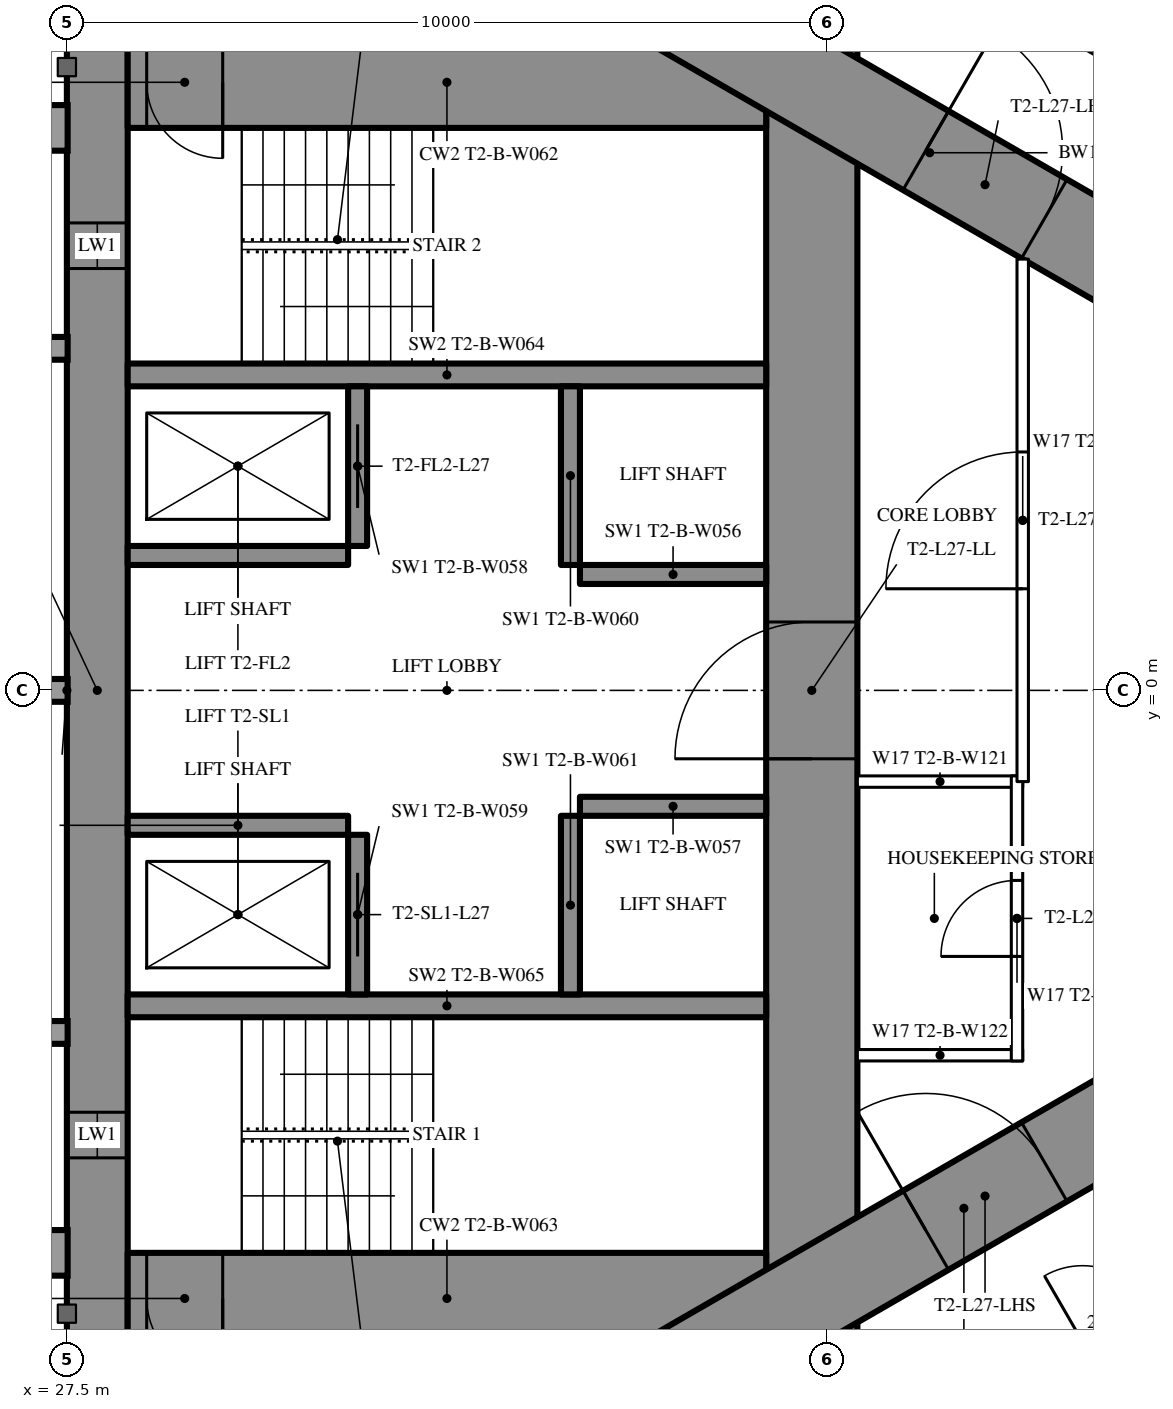
"""IFC4 building model, lengths in metres.
Left out: names, types, materials, properties, quantities, classifications, styles, units other than length and angle.
Written with IfcOpenShell. Run it as: python <this file> out.ifc"""

import sys

from ifc_helpers import new_model, si_unit, direction, frame, frame_2d, origin, place, context, subcontext, project, spatial, rectangle, extrude, element, fill, save


model = new_model("IFC4")
c1 = context("Model", 3, precision=1e-05, world=origin(), true_north=direction((0.0, 1.0)))
c2 = subcontext(c1, "Body", "Model", "MODEL_VIEW")
j1 = project(units=[si_unit("LENGTHUNIT", "METRE"), si_unit("PLANEANGLEUNIT", "RADIAN")], contexts=[c1])
p1 = place(None, origin())
s1 = spatial("IfcSite", under=j1, at=p1, CompositionType="ELEMENT")
p2 = place(p1, origin())
s2 = spatial("IfcBuilding", under=s1, at=p2, CompositionType="ELEMENT")
p3 = place(p2, frame((0.0, 0.0, 104.6)))
s3 = spatial("IfcBuildingStorey", under=s2, at=p3, CompositionType="ELEMENT", Elevation=104.6)
p4 = place(p3, frame((27.9, -8.6, 0.0), z_axis=(0.0, 0.0, 1.0), x_axis=(0.0, 1.0, 0.0)))
e1 = element("IfcWall", 1, at=p4, inside=s3, PredefinedType="SHEAR", context=c2, shape_type="SweptSolid", body=[
    extrude(rectangle(XDim=17.2, YDim=0.8, at=frame_2d((8.6, 0.0))), origin(), (0.0, 0.0, 1.0), 3.5),
])
p5 = place(p4, frame((2.45, 0.0, 0.6)))
e2 = element("IfcOpeningElement", 2, at=p5, cuts=e1, PredefinedType="OPENING", context=c2, shape_type="SweptSolid", body=[
    extrude(rectangle(XDim=0.6, YDim=2.1, at=frame_2d((0.3, 1.05))), frame((0.0, 0.41, 0.0), z_axis=(0.0, -1.0, 0.0), x_axis=(1.0, 0.0, 0.0)), (0.0, 0.0, 1.0), 0.82),
])
p6 = place(p4, frame((14.15, 0.0, 0.6)))
e3 = element("IfcOpeningElement", 3, at=p6, cuts=e1, PredefinedType="OPENING", context=c2, shape_type="SweptSolid", body=[
    extrude(rectangle(XDim=0.6, YDim=2.1, at=frame_2d((0.3, 1.05))), frame((0.0, 0.41, 0.0), z_axis=(0.0, -1.0, 0.0), x_axis=(1.0, 0.0, 0.0)), (0.0, 0.0, 1.0), 0.82),
])
p7 = place(p3, frame((37.3, -8.6, 0.0), z_axis=(0.0, 0.0, 1.0), x_axis=(0.0, 1.0, 0.0)))
e4 = element("IfcWall", 4, at=p7, inside=s3, PredefinedType="SHEAR", context=c2, shape_type="SweptSolid", body=[
    extrude(rectangle(XDim=17.2, YDim=1.2, at=frame_2d((8.6, 0.0))), origin(), (0.0, 0.0, 1.0), 3.5),
])
p8 = place(p7, frame((7.7, 0.0, 0.0)))
e5 = element("IfcOpeningElement", 5, at=p8, cuts=e4, PredefinedType="OPENING", context=c2, shape_type="SweptSolid", body=[
    extrude(rectangle(XDim=1.8, YDim=2.2, at=frame_2d((0.9, 1.1))), frame((0.0, 0.61, 0.0), z_axis=(0.0, -1.0, 0.0), x_axis=(1.0, 0.0, 0.0)), (0.0, 0.0, 1.0), 1.22),
])
p9 = place(p3, frame((28.3, -8.0, 0.0), z_axis=(0.0, 0.0, 1.0), x_axis=(1.0, 0.0, 0.0)))
e6 = element("IfcWall", 6, at=p9, inside=s3, PredefinedType="SHEAR", context=c2, shape_type="SweptSolid", body=[
    extrude(rectangle(XDim=8.4, YDim=1.2, at=frame_2d((4.2, 0.0))), origin(), (0.0, 0.0, 1.0), 3.5),
])
p10 = place(p9, frame((0.25, 0.0, 0.0)))
e7 = element("IfcOpeningElement", 7, at=p10, cuts=e6, PredefinedType="OPENING", context=c2, shape_type="SweptSolid", body=[
    extrude(rectangle(XDim=1.0, YDim=2.2, at=frame_2d((0.5, 1.1))), frame((0.0, 0.61, 0.0), z_axis=(0.0, -1.0, 0.0), x_axis=(1.0, 0.0, 0.0)), (0.0, 0.0, 1.0), 1.22),
])
p11 = place(p3, frame((28.3, 8.0, 0.0), z_axis=(0.0, 0.0, 1.0), x_axis=(1.0, 0.0, 0.0)))
e8 = element("IfcWall", 8, at=p11, inside=s3, PredefinedType="SHEAR", context=c2, shape_type="SweptSolid", body=[
    extrude(rectangle(XDim=8.4, YDim=1.2, at=frame_2d((4.2, 0.0))), origin(), (0.0, 0.0, 1.0), 3.5),
])
p12 = place(p11, frame((0.25, 0.0, 0.0)))
e9 = element("IfcOpeningElement", 9, at=p12, cuts=e8, PredefinedType="OPENING", context=c2, shape_type="SweptSolid", body=[
    extrude(rectangle(XDim=1.0, YDim=2.2, at=frame_2d((0.5, 1.1))), frame((0.0, 0.61, 0.0), z_axis=(0.0, -1.0, 0.0), x_axis=(1.0, 0.0, 0.0)), (0.0, 0.0, 1.0), 1.22),
])
for number, where, z_axis, x_axis in (
    (10, (28.3, -4.15, 0.0), (0.0, 0.0, 1.0), (1.0, 0.0, 0.0)),
    (11, (28.3, 4.15, 0.0), (0.0, 0.0, 1.0), (1.0, 0.0, 0.0)),
):
    element("IfcWall", number, at=place(p3, frame(where, z_axis=z_axis, x_axis=x_axis)), inside=s3, PredefinedType="SHEAR", context=c2, shape_type="SweptSolid", body=[
        extrude(rectangle(XDim=8.4, YDim=0.3, at=frame_2d((4.2, 0.0))), origin(), (0.0, 0.0, 1.0), 3.5),
    ])
p13 = place(p3, frame((31.325, -4.0, 0.0), z_axis=(0.0, 0.0, 1.0), x_axis=(0.0, 1.0, 0.0)))
e12 = element("IfcWall", 12, at=p13, inside=s3, PredefinedType="SHEAR", context=c2, shape_type="SweptSolid", body=[
    extrude(rectangle(XDim=2.1, YDim=0.25, at=frame_2d((1.05, 0.0))), origin(), (0.0, 0.0, 1.0), 3.5),
])
p14 = place(p13, frame((0.5, 0.0, 0.0)))
e13 = element("IfcOpeningElement", 13, at=p14, cuts=e12, PredefinedType="OPENING", context=c2, shape_type="SweptSolid", body=[
    extrude(rectangle(XDim=1.1, YDim=2.2, at=frame_2d((0.55, 1.1))), frame((0.0, 0.135, 0.0), z_axis=(0.0, -1.0, 0.0), x_axis=(1.0, 0.0, 0.0)), (0.0, 0.0, 1.0), 0.27),
])
p15 = place(p3, frame((34.125, -4.0, 0.0), z_axis=(0.0, 0.0, 1.0), x_axis=(0.0, 1.0, 0.0)))
e14 = element("IfcWall", 14, at=p15, inside=s3, PredefinedType="SHEAR", context=c2, shape_type="SweptSolid", body=[
    extrude(rectangle(XDim=2.35, YDim=0.25, at=frame_2d((1.175, 0.0))), origin(), (0.0, 0.0, 1.0), 3.5),
])
p16 = place(p3, frame((28.3, -1.775, 0.0), z_axis=(0.0, 0.0, 1.0), x_axis=(1.0, 0.0, 0.0)))
e15 = element("IfcWall", 15, at=p16, inside=s3, PredefinedType="SHEAR", context=c2, shape_type="SweptSolid", body=[
    extrude(rectangle(XDim=2.9, YDim=0.25, at=frame_2d((1.45, 0.0))), origin(), (0.0, 0.0, 1.0), 3.5),
])
p17 = place(p3, frame((34.25, -1.525, 0.0), z_axis=(0.0, 0.0, 1.0), x_axis=(1.0, 0.0, 0.0)))
e16 = element("IfcWall", 16, at=p17, inside=s3, PredefinedType="SHEAR", context=c2, shape_type="SweptSolid", body=[
    extrude(rectangle(XDim=2.45, YDim=0.25, at=frame_2d((1.225, 0.0))), origin(), (0.0, 0.0, 1.0), 3.5),
])
p18 = place(p3, frame((31.325, 1.9, 0.0), z_axis=(0.0, 0.0, 1.0), x_axis=(0.0, 1.0, 0.0)))
e17 = element("IfcWall", 17, at=p18, inside=s3, PredefinedType="SHEAR", context=c2, shape_type="SweptSolid", body=[
    extrude(rectangle(XDim=2.1, YDim=0.25, at=frame_2d((1.05, 0.0))), origin(), (0.0, 0.0, 1.0), 3.5),
])
p19 = place(p18, frame((0.5, 0.0, 0.0)))
e18 = element("IfcOpeningElement", 18, at=p19, cuts=e17, PredefinedType="OPENING", context=c2, shape_type="SweptSolid", body=[
    extrude(rectangle(XDim=1.1, YDim=2.2, at=frame_2d((0.55, 1.1))), frame((0.0, 0.135, 0.0), z_axis=(0.0, -1.0, 0.0), x_axis=(1.0, 0.0, 0.0)), (0.0, 0.0, 1.0), 0.27),
])
p20 = place(p3, frame((34.125, 1.65, 0.0), z_axis=(0.0, 0.0, 1.0), x_axis=(0.0, 1.0, 0.0)))
e19 = element("IfcWall", 19, at=p20, inside=s3, PredefinedType="SHEAR", context=c2, shape_type="SweptSolid", body=[
    extrude(rectangle(XDim=2.35, YDim=0.25, at=frame_2d((1.175, 0.0))), origin(), (0.0, 0.0, 1.0), 3.5),
])
p21 = place(p3, frame((28.3, 1.775, 0.0), z_axis=(0.0, 0.0, 1.0), x_axis=(1.0, 0.0, 0.0)))
e20 = element("IfcWall", 20, at=p21, inside=s3, PredefinedType="SHEAR", context=c2, shape_type="SweptSolid", body=[
    extrude(rectangle(XDim=2.9, YDim=0.25, at=frame_2d((1.45, 0.0))), origin(), (0.0, 0.0, 1.0), 3.5),
])
p22 = place(p3, frame((34.25, 1.525, 0.0), z_axis=(0.0, 0.0, 1.0), x_axis=(1.0, 0.0, 0.0)))
e21 = element("IfcWall", 21, at=p22, inside=s3, PredefinedType="SHEAR", context=c2, shape_type="SweptSolid", body=[
    extrude(rectangle(XDim=2.45, YDim=0.25, at=frame_2d((1.225, 0.0))), origin(), (0.0, 0.0, 1.0), 3.5),
])
p23 = place(p3, frame((27.2, -13.8, 0.0), z_axis=(0.0, 0.0, 1.0), x_axis=(0.866027159892, 0.499996958321, 0.0)))
e22 = element("IfcWall", 22, at=p23, inside=s3, PredefinedType="SHEAR", context=c2, shape_type="SweptSolid", body=[
    extrude(rectangle(XDim=27.947, YDim=1.2, at=frame_2d((13.973, 0.0))), origin(), (0.0, 0.0, 1.0), 3.5),
])
p24 = place(p23, frame((4.6, 0.0, 0.0)))
e23 = element("IfcOpeningElement", 23, at=p24, cuts=e22, PredefinedType="OPENING", context=c2, shape_type="SweptSolid", body=[
    extrude(rectangle(XDim=1.0, YDim=2.2, at=frame_2d((0.5, 1.1))), frame((0.0, 0.61, 0.0), z_axis=(0.0, -1.0, 0.0), x_axis=(1.0, 0.0, 0.0)), (0.0, 0.0, 1.0), 1.22),
])
p25 = place(p23, frame((13.395, 0.0, 0.0)))
e24 = element("IfcOpeningElement", 24, at=p25, cuts=e22, PredefinedType="OPENING", context=c2, shape_type="SweptSolid", body=[
    extrude(rectangle(XDim=1.8, YDim=2.2, at=frame_2d((0.9, 1.1))), frame((0.0, 0.61, 0.0), z_axis=(0.0, -1.0, 0.0), x_axis=(1.0, 0.0, 0.0)), (0.0, 0.0, 1.0), 1.22),
])
p26 = place(p3, frame((27.2, 13.8, 0.0), z_axis=(0.0, 0.0, 1.0), x_axis=(0.866024515034, -0.500001539357, 0.0)))
e25 = element("IfcWall", 25, at=p26, inside=s3, PredefinedType="SHEAR", context=c2, shape_type="SweptSolid", body=[
    extrude(rectangle(XDim=26.907, YDim=1.2, at=frame_2d((13.454, 0.0))), origin(), (0.0, 0.0, 1.0), 3.5),
])
p27 = place(p26, frame((4.6, 0.0, 0.0)))
e26 = element("IfcOpeningElement", 26, at=p27, cuts=e25, PredefinedType="OPENING", context=c2, shape_type="SweptSolid", body=[
    extrude(rectangle(XDim=1.0, YDim=2.2, at=frame_2d((0.5, 1.1))), frame((0.0, 0.61, 0.0), z_axis=(0.0, -1.0, 0.0), x_axis=(1.0, 0.0, 0.0)), (0.0, 0.0, 1.0), 1.22),
])
p28 = place(p26, frame((13.395, 0.0, 0.0)))
e27 = element("IfcOpeningElement", 27, at=p28, cuts=e25, PredefinedType="OPENING", context=c2, shape_type="SweptSolid", body=[
    extrude(rectangle(XDim=1.8, YDim=2.2, at=frame_2d((0.9, 1.1))), frame((0.0, 0.61, 0.0), z_axis=(0.0, -1.0, 0.0), x_axis=(1.0, 0.0, 0.0)), (0.0, 0.0, 1.0), 1.22),
])
p29 = place(p3, frame((36.834, 10.894, 0.0), z_axis=(0.0, 0.0, 1.0), x_axis=(0.866028157229, -0.499995230863, 0.0)))
e28 = element("IfcWall", 28, at=p29, inside=s3, PredefinedType="PARTITIONING", context=c2, shape_type="SweptSolid", body=[
    extrude(rectangle(XDim=21.667, YDim=0.2, at=frame_2d((10.833, 0.0))), origin(), (0.0, 0.0, 1.0), 3.25),
])
p30 = place(p29, frame((20.117, 0.0, 0.0)))
e29 = element("IfcOpeningElement", 29, at=p30, cuts=e28, PredefinedType="OPENING", context=c2, shape_type="SweptSolid", body=[
    extrude(rectangle(XDim=0.95, YDim=2.2, at=frame_2d((0.475, 1.1))), frame((0.0, 0.11, 0.0), z_axis=(0.0, -1.0, 0.0), x_axis=(1.0, 0.0, 0.0)), (0.0, 0.0, 1.0), 0.22),
])
p31 = place(p29, frame((14.335, 0.0, 0.0)))
e30 = element("IfcOpeningElement", 30, at=p31, cuts=e28, PredefinedType="OPENING", context=c2, shape_type="SweptSolid", body=[
    extrude(rectangle(XDim=0.95, YDim=2.2, at=frame_2d((0.475, 1.1))), frame((0.0, 0.11, 0.0), z_axis=(0.0, -1.0, 0.0), x_axis=(1.0, 0.0, 0.0)), (0.0, 0.0, 1.0), 0.22),
])
p32 = place(p29, frame((9.693, 0.0, 0.0)))
e31 = element("IfcOpeningElement", 31, at=p32, cuts=e28, PredefinedType="OPENING", context=c2, shape_type="SweptSolid", body=[
    extrude(rectangle(XDim=0.95, YDim=2.2, at=frame_2d((0.475, 1.1))), frame((0.0, 0.11, 0.0), z_axis=(0.0, -1.0, 0.0), x_axis=(1.0, 0.0, 0.0)), (0.0, 0.0, 1.0), 0.22),
])
p33 = place(p29, frame((2.95, 0.0, 0.0)))
e32 = element("IfcOpeningElement", 32, at=p33, cuts=e28, PredefinedType="OPENING", context=c2, shape_type="SweptSolid", body=[
    extrude(rectangle(XDim=0.95, YDim=2.2, at=frame_2d((0.475, 1.1))), frame((0.0, 0.11, 0.0), z_axis=(0.0, -1.0, 0.0), x_axis=(1.0, 0.0, 0.0)), (0.0, 0.0, 1.0), 0.22),
])
p34 = place(p3, frame((37.96, -10.243, 0.0), z_axis=(0.0, 0.0, 1.0), x_axis=(0.86603350054, 0.499985975746, 0.0)))
e33 = element("IfcWall", 33, at=p34, inside=s3, PredefinedType="PARTITIONING", context=c2, shape_type="SweptSolid", body=[
    extrude(rectangle(XDim=7.993, YDim=0.2, at=frame_2d((3.997, 0.0))), origin(), (0.0, 0.0, 1.0), 3.25),
])
p35 = place(p34, frame((3.35, 0.0, 0.0)))
e34 = element("IfcOpeningElement", 34, at=p35, cuts=e33, PredefinedType="OPENING", context=c2, shape_type="SweptSolid", body=[
    extrude(rectangle(XDim=1.0, YDim=2.2, at=frame_2d((0.5, 1.1))), frame((0.0, 0.11, 0.0), z_axis=(0.0, -1.0, 0.0), x_axis=(1.0, 0.0, 0.0)), (0.0, 0.0, 1.0), 0.22),
])
for number, where, z_axis, x_axis in (
    (35, (37.9, -1.2, 0.0), (0.0, 0.0, 1.0), (1.0, 0.0, 0.0)),
    (36, (37.9, -4.8, 0.0), (0.0, 0.0, 1.0), (1.0, 0.0, 0.0)),
):
    element("IfcWall", number, at=place(p3, frame(where, z_axis=z_axis, x_axis=x_axis)), inside=s3, PredefinedType="PARTITIONING", context=c2, shape_type="SweptSolid", body=[
        extrude(rectangle(XDim=2.175, YDim=0.15, at=frame_2d((1.087, 0.0))), origin(), (0.0, 0.0, 1.0), 3.25),
    ])
p36 = place(p3, frame((40.0, -4.875, 0.0), z_axis=(0.0, 0.0, 1.0), x_axis=(0.0, 1.0, 0.0)))
e37 = element("IfcWall", 37, at=p36, inside=s3, PredefinedType="PARTITIONING", context=c2, shape_type="SweptSolid", body=[
    extrude(rectangle(XDim=3.75, YDim=0.15, at=frame_2d((1.875, 0.0))), origin(), (0.0, 0.0, 1.0), 3.25),
])
p37 = place(p36, frame((1.375, 0.0, 0.0)))
e38 = element("IfcOpeningElement", 38, at=p37, cuts=e37, PredefinedType="OPENING", context=c2, shape_type="SweptSolid", body=[
    extrude(rectangle(XDim=1.0, YDim=2.2, at=frame_2d((0.5, 1.1))), frame((0.0, 0.085, 0.0), z_axis=(0.0, -1.0, 0.0), x_axis=(1.0, 0.0, 0.0)), (0.0, 0.0, 1.0), 0.17),
])
p38 = place(p3, frame((40.075, -1.2, 0.0), z_axis=(0.0, 0.0, 1.0), x_axis=(0.0, 1.0, 0.0)))
e39 = element("IfcWall", 39, at=p38, inside=s3, PredefinedType="PARTITIONING", context=c2, shape_type="SweptSolid", body=[
    extrude(rectangle(XDim=6.874, YDim=0.15, at=frame_2d((3.437, 0.0))), origin(), (0.0, 0.0, 1.0), 3.25),
])
p39 = place(p38, frame((2.537, 0.0, 0.0)))
e40 = element("IfcOpeningElement", 40, at=p39, cuts=e39, PredefinedType="OPENING", context=c2, shape_type="SweptSolid", body=[
    extrude(rectangle(XDim=1.8, YDim=2.2, at=frame_2d((0.9, 1.1))), frame((0.0, 0.085, 0.0), z_axis=(0.0, -1.0, 0.0), x_axis=(1.0, 0.0, 0.0)), (0.0, 0.0, 1.0), 0.17),
])
p40 = place(p35, origin())
e41 = element("IfcDoor", 41, at=p40, inside=s3, OperationType="SINGLE_SWING_LEFT", PredefinedType="DOOR", context=c2, shape_type="SweptSolid", body=[
    extrude(rectangle(XDim=1.0, YDim=2.2, at=frame_2d((0.5, 1.1))), frame((0.0, 0.025, 0.0), z_axis=(0.0, -1.0, 0.0), x_axis=(1.0, 0.0, 0.0)), (0.0, 0.0, 1.0), 0.05),
])
fill(e34, e41)
p41 = place(p37, origin())
e42 = element("IfcDoor", 42, at=p41, inside=s3, OperationType="SINGLE_SWING_LEFT", PredefinedType="DOOR", context=c2, shape_type="SweptSolid", body=[
    extrude(rectangle(XDim=1.0, YDim=2.2, at=frame_2d((0.5, 1.1))), frame((0.0, 0.025, 0.0), z_axis=(0.0, -1.0, 0.0), x_axis=(1.0, 0.0, 0.0)), (0.0, 0.0, 1.0), 0.05),
])
fill(e38, e42)
p42 = place(p39, origin())
e43 = element("IfcDoor", 43, at=p42, inside=s3, OperationType="DOUBLE_DOOR_SINGLE_SWING", PredefinedType="DOOR", context=c2, shape_type="SweptSolid", body=[
    extrude(rectangle(XDim=1.8, YDim=2.2, at=frame_2d((0.9, 1.1))), frame((0.0, 0.025, 0.0), z_axis=(0.0, -1.0, 0.0), x_axis=(1.0, 0.0, 0.0)), (0.0, 0.0, 1.0), 0.05),
])
fill(e40, e43)
p43 = place(p25, origin())
e44 = element("IfcDoor", 44, at=p43, inside=s3, OperationType="DOUBLE_DOOR_SINGLE_SWING", PredefinedType="DOOR", context=c2, shape_type="SweptSolid", body=[
    extrude(rectangle(XDim=1.8, YDim=2.2, at=frame_2d((0.9, 1.1))), frame((0.0, 0.025, 0.0), z_axis=(0.0, -1.0, 0.0), x_axis=(1.0, 0.0, 0.0)), (0.0, 0.0, 1.0), 0.05),
])
fill(e24, e44)
p44 = place(p28, origin())
e45 = element("IfcDoor", 45, at=p44, inside=s3, OperationType="DOUBLE_DOOR_SINGLE_SWING", PredefinedType="DOOR", context=c2, shape_type="SweptSolid", body=[
    extrude(rectangle(XDim=1.8, YDim=2.2, at=frame_2d((0.9, 1.1))), frame((0.0, 0.025, 0.0), z_axis=(0.0, -1.0, 0.0), x_axis=(1.0, 0.0, 0.0)), (0.0, 0.0, 1.0), 0.05),
])
fill(e27, e45)
p45 = place(p8, origin())
e46 = element("IfcDoor", 46, at=p45, inside=s3, OperationType="DOUBLE_DOOR_SINGLE_SWING", PredefinedType="DOOR", context=c2, shape_type="SweptSolid", body=[
    extrude(rectangle(XDim=1.8, YDim=2.2, at=frame_2d((0.9, 1.1))), frame((0.0, 0.025, 0.0), z_axis=(0.0, -1.0, 0.0), x_axis=(1.0, 0.0, 0.0)), (0.0, 0.0, 1.0), 0.05),
])
fill(e5, e46)
p46 = place(p10, origin())
e47 = element("IfcDoor", 47, at=p46, inside=s3, OperationType="SINGLE_SWING_RIGHT", PredefinedType="DOOR", context=c2, shape_type="SweptSolid", body=[
    extrude(rectangle(XDim=1.0, YDim=2.2, at=frame_2d((0.5, 1.1))), frame((0.0, 0.025, 0.0), z_axis=(0.0, -1.0, 0.0), x_axis=(1.0, 0.0, 0.0)), (0.0, 0.0, 1.0), 0.05),
])
fill(e7, e47)
p47 = place(p12, origin())
e48 = element("IfcDoor", 48, at=p47, inside=s3, OperationType="SINGLE_SWING_RIGHT", PredefinedType="DOOR", context=c2, shape_type="SweptSolid", body=[
    extrude(rectangle(XDim=1.0, YDim=2.2, at=frame_2d((0.5, 1.1))), frame((0.0, 0.025, 0.0), z_axis=(0.0, -1.0, 0.0), x_axis=(1.0, 0.0, 0.0)), (0.0, 0.0, 1.0), 0.05),
])
fill(e9, e48)
p48 = place(p14, origin())
e49 = element("IfcDoor", 49, at=p48, inside=s3, OperationType="SLIDING_TO_LEFT", PredefinedType="USERDEFINED", context=c2, shape_type="SweptSolid", body=[
    extrude(rectangle(XDim=1.1, YDim=2.2, at=frame_2d((0.55, 1.1))), frame((0.0, 0.025, 0.0), z_axis=(0.0, -1.0, 0.0), x_axis=(1.0, 0.0, 0.0)), (0.0, 0.0, 1.0), 0.05),
])
fill(e13, e49)
p49 = place(p19, origin())
e50 = element("IfcDoor", 50, at=p49, inside=s3, OperationType="SLIDING_TO_LEFT", PredefinedType="USERDEFINED", context=c2, shape_type="SweptSolid", body=[
    extrude(rectangle(XDim=1.1, YDim=2.2, at=frame_2d((0.55, 1.1))), frame((0.0, 0.025, 0.0), z_axis=(0.0, -1.0, 0.0), x_axis=(1.0, 0.0, 0.0)), (0.0, 0.0, 1.0), 0.05),
])
fill(e18, e50)
p50 = place(p5, origin())
e51 = element("IfcWindow", 51, at=p50, inside=s3, PartitioningType="SINGLE_PANEL", PredefinedType="WINDOW", context=c2, shape_type="SweptSolid", body=[
    extrude(rectangle(XDim=0.6, YDim=2.1, at=frame_2d((0.3, 1.05))), frame((0.0, 0.03, 0.0), z_axis=(0.0, -1.0, 0.0), x_axis=(1.0, 0.0, 0.0)), (0.0, 0.0, 1.0), 0.06),
])
fill(e2, e51)
p51 = place(p6, origin())
e52 = element("IfcWindow", 52, at=p51, inside=s3, PartitioningType="SINGLE_PANEL", PredefinedType="WINDOW", context=c2, shape_type="SweptSolid", body=[
    extrude(rectangle(XDim=0.6, YDim=2.1, at=frame_2d((0.3, 1.05))), frame((0.0, 0.03, 0.0), z_axis=(0.0, -1.0, 0.0), x_axis=(1.0, 0.0, 0.0)), (0.0, 0.0, 1.0), 0.06),
])
fill(e3, e52)
save(model, sys.argv[1])
